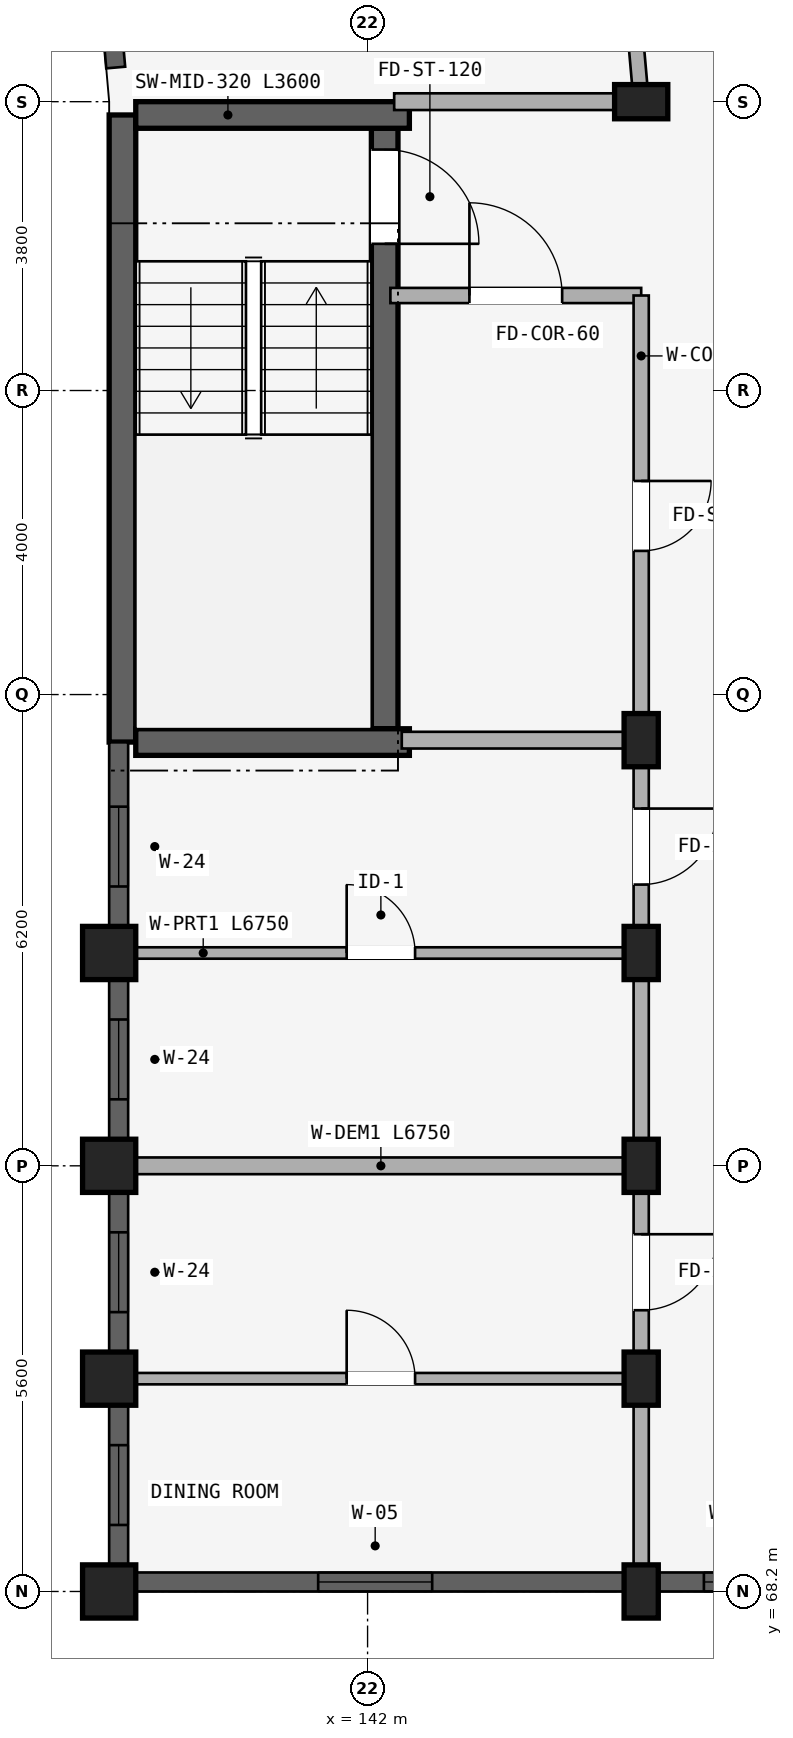
"""IFC4 building model, lengths in metres.
Left out: names, types, materials, properties, quantities, classifications, styles, units other than length and angle.
Written with IfcOpenShell. Run it as: python <this file> out.ifc"""

import sys

from ifc_helpers import new_model, si_unit, direction, frame, frame_2d, origin, origin_2d, place, context, subcontext, project, spatial, rectangle, extrude, element, fill, save


model = new_model("IFC4")
c1 = context("Model", 3, precision=1e-05, world=origin(), true_north=direction((0.0, 1.0)))
c2 = subcontext(c1, "Body", "Model", "MODEL_VIEW")
j1 = project(units=[si_unit("LENGTHUNIT", "METRE"), si_unit("PLANEANGLEUNIT", "RADIAN")], contexts=[c1])
p1 = place(None, origin())
s1 = spatial("IfcSite", under=j1, at=p1, CompositionType="ELEMENT")
p2 = place(p1, origin())
s2 = spatial("IfcBuilding", under=s1, at=p2, CompositionType="ELEMENT")
p3 = place(p2, frame((0.0, 0.0, 21.3)))
s3 = spatial("IfcBuildingStorey", under=s2, at=p3, CompositionType="ELEMENT", Elevation=21.3)
p4 = place(p3, frame((138.775, 87.625, 0.0), z_axis=(0.0, 0.0, 1.0), x_axis=(0.0, -1.0, 0.0)))
e1 = element("IfcWall", 1, at=p4, inside=s3, PredefinedType="SHEAR", context=c2, shape_type="SweptSolid", body=[
    extrude(rectangle(XDim=8.25, YDim=0.35, at=frame_2d((4.125, 0.0))), origin(), (0.0, 0.0, 1.0), 2.93),
])
p5 = place(p3, frame((142.225, 87.45, 0.0), z_axis=(0.0, 0.0, 1.0), x_axis=(0.0, -1.0, 0.0)))
e2 = element("IfcWall", 2, at=p5, inside=s3, PredefinedType="SHEAR", context=c2, shape_type="SweptSolid", body=[
    extrude(rectangle(XDim=7.9, YDim=0.35, at=frame_2d((3.95, 0.0))), origin(), (0.0, 0.0, 1.0), 2.93),
])
p6 = place(p5, frame((0.28, 0.0, 0.0)))
e3 = element("IfcOpeningElement", 3, at=p6, cuts=e2, PredefinedType="OPENING", context=c2, shape_type="SweptSolid", body=[
    extrude(rectangle(XDim=1.24, YDim=2.15, at=frame_2d((0.62, 1.075))), frame((0.0, 0.185, 0.0), z_axis=(0.0, -1.0, 0.0), x_axis=(1.0, 0.0, 0.0)), (0.0, 0.0, 1.0), 0.37),
])
for number, where, z_axis, x_axis in (
    (4, (138.95, 87.625, 0.0), (0.0, 0.0, 1.0), (1.0, 0.0, 0.0)),
    (5, (138.95, 79.375, 0.0), (0.0, 0.0, 1.0), (1.0, 0.0, 0.0)),
):
    element("IfcWall", number, at=place(p3, frame(where, z_axis=z_axis, x_axis=x_axis)), inside=s3, PredefinedType="SHEAR", context=c2, shape_type="SweptSolid", body=[
        extrude(rectangle(XDim=3.6, YDim=0.35, at=frame_2d((1.8, 0.0))), origin(), (0.0, 0.0, 1.0), 2.93),
    ])
for number, where, z_axis, x_axis in (
    (6, (145.6, 87.8, 0.0), (0.0, 0.0, 1.0), (0.0, 1.0, 0.0)),
    (7, (145.6, 79.4, 0.0), (0.0, 0.0, 1.0), (1.0, 0.0, 0.0)),
):
    element("IfcColumn", number, at=place(p3, frame(where, z_axis=z_axis, x_axis=x_axis)), inside=s3, PredefinedType="COLUMN", context=c2, shape_type="SweptSolid", body=[
        extrude(rectangle(XDim=0.45, YDim=0.7, at=origin_2d()), origin(), (0.0, 0.0, 1.0), 2.93),
    ])
p7 = place(p3, frame((138.6, 76.6, 0.0), z_axis=(0.0, 0.0, 1.0), x_axis=(1.0, 0.0, 0.0)))
e8 = element("IfcColumn", 8, at=p7, inside=s3, PredefinedType="COLUMN", context=c2, shape_type="SweptSolid", body=[
    extrude(rectangle(XDim=0.7, YDim=0.7, at=origin_2d()), origin(), (0.0, 0.0, 1.0), 2.93),
])
p8 = place(p3, frame((145.6, 76.6, 0.0), z_axis=(0.0, 0.0, 1.0), x_axis=(1.0, 0.0, 0.0)))
e9 = element("IfcColumn", 9, at=p8, inside=s3, PredefinedType="COLUMN", context=c2, shape_type="SweptSolid", body=[
    extrude(rectangle(XDim=0.45, YDim=0.7, at=origin_2d()), origin(), (0.0, 0.0, 1.0), 2.93),
])
p9 = place(p3, frame((138.6, 73.8, 0.0), z_axis=(0.0, 0.0, 1.0), x_axis=(1.0, 0.0, 0.0)))
e10 = element("IfcColumn", 10, at=p9, inside=s3, PredefinedType="COLUMN", context=c2, shape_type="SweptSolid", body=[
    extrude(rectangle(XDim=0.7, YDim=0.7, at=origin_2d()), origin(), (0.0, 0.0, 1.0), 2.93),
])
p10 = place(p3, frame((145.6, 73.8, 0.0), z_axis=(0.0, 0.0, 1.0), x_axis=(1.0, 0.0, 0.0)))
e11 = element("IfcColumn", 11, at=p10, inside=s3, PredefinedType="COLUMN", context=c2, shape_type="SweptSolid", body=[
    extrude(rectangle(XDim=0.45, YDim=0.7, at=origin_2d()), origin(), (0.0, 0.0, 1.0), 2.93),
])
p11 = place(p3, frame((138.6, 71.0, 0.0), z_axis=(0.0, 0.0, 1.0), x_axis=(1.0, 0.0, 0.0)))
e12 = element("IfcColumn", 12, at=p11, inside=s3, PredefinedType="COLUMN", context=c2, shape_type="SweptSolid", body=[
    extrude(rectangle(XDim=0.7, YDim=0.7, at=origin_2d()), origin(), (0.0, 0.0, 1.0), 2.93),
])
p12 = place(p3, frame((145.6, 71.0, 0.0), z_axis=(0.0, 0.0, 1.0), x_axis=(1.0, 0.0, 0.0)))
e13 = element("IfcColumn", 13, at=p12, inside=s3, PredefinedType="COLUMN", context=c2, shape_type="SweptSolid", body=[
    extrude(rectangle(XDim=0.45, YDim=0.7, at=origin_2d()), origin(), (0.0, 0.0, 1.0), 2.93),
])
p13 = place(p3, frame((138.6, 68.2, 0.0), z_axis=(0.0, 0.0, 1.0), x_axis=(1.0, 0.0, 0.0)))
e14 = element("IfcColumn", 14, at=p13, inside=s3, PredefinedType="COLUMN", context=c2, shape_type="SweptSolid", body=[
    extrude(rectangle(XDim=0.7, YDim=0.7, at=origin_2d()), origin(), (0.0, 0.0, 1.0), 2.93),
])
p14 = place(p3, frame((145.6, 68.2, 0.0), z_axis=(0.0, 0.0, 1.0), x_axis=(1.0, 0.0, 0.0)))
e15 = element("IfcColumn", 15, at=p14, inside=s3, PredefinedType="COLUMN", context=c2, shape_type="SweptSolid", body=[
    extrude(rectangle(XDim=0.45, YDim=0.7, at=origin_2d()), origin(), (0.0, 0.0, 1.0), 2.93),
])
p15 = place(p3, frame((142.3, 85.25, 0.0), z_axis=(0.0, 0.0, 1.0), x_axis=(1.0, 0.0, 0.0)))
e16 = element("IfcWall", 16, at=p15, inside=s3, PredefinedType="STANDARD", context=c2, shape_type="SweptSolid", body=[
    extrude(rectangle(XDim=3.3, YDim=0.2, at=frame_2d((1.65, 0.0))), origin(), (0.0, 0.0, 1.0), 2.372),
])
p16 = place(p15, frame((1.04, 0.0, 0.0)))
e17 = element("IfcOpeningElement", 17, at=p16, cuts=e16, PredefinedType="OPENING", context=c2, shape_type="SweptSolid", body=[
    extrude(rectangle(XDim=1.22, YDim=2.15, at=frame_2d((0.61, 1.075))), frame((0.0, 0.11, 0.0), z_axis=(0.0, -1.0, 0.0), x_axis=(1.0, 0.0, 0.0)), (0.0, 0.0, 1.0), 0.22),
])
p17 = place(p3, frame((145.6, 85.25, 0.0), z_axis=(0.0, 0.0, 1.0), x_axis=(0.0, -1.0, 0.0)))
e18 = element("IfcWall", 18, at=p17, inside=s3, PredefinedType="STANDARD", context=c2, shape_type="SweptSolid", body=[
    extrude(rectangle(XDim=5.8, YDim=0.2, at=frame_2d((2.9, 0.0))), origin(), (0.0, 0.0, 1.0), 2.372),
])
p18 = place(p17, frame((2.44, 0.0, 0.0)))
e19 = element("IfcOpeningElement", 19, at=p18, cuts=e18, PredefinedType="OPENING", context=c2, shape_type="SweptSolid", body=[
    extrude(rectangle(XDim=0.92, YDim=2.1, at=frame_2d((0.46, 1.05))), frame((0.0, 0.11, 0.0), z_axis=(0.0, -1.0, 0.0), x_axis=(1.0, 0.0, 0.0)), (0.0, 0.0, 1.0), 0.22),
])
p19 = place(p3, frame((145.208, 92.28, 0.0), z_axis=(0.0, 0.0, 1.0), x_axis=(0.087187153726, -0.996191949488, 0.0)))
e20 = element("IfcWall", 20, at=p19, inside=s3, PredefinedType="STANDARD", context=c2, shape_type="SweptSolid", body=[
    extrude(rectangle(XDim=4.497, YDim=0.2, at=frame_2d((2.249, 0.0))), origin(), (0.0, 0.0, 1.0), 2.372),
])
p20 = place(p3, frame((142.35, 87.8, 0.0), z_axis=(0.0, 0.0, 1.0), x_axis=(1.0, 0.0, 0.0)))
e21 = element("IfcWall", 21, at=p20, inside=s3, PredefinedType="STANDARD", context=c2, shape_type="SweptSolid", body=[
    extrude(rectangle(XDim=3.2, YDim=0.22, at=frame_2d((1.6, 0.0))), origin(), (0.0, 0.0, 1.0), 2.372),
])
p21 = place(p3, frame((145.6, 79.4, 0.0), z_axis=(0.0, 0.0, 1.0), x_axis=(0.0, -1.0, 0.0)))
e22 = element("IfcWall", 22, at=p21, inside=s3, PredefinedType="STANDARD", context=c2, shape_type="SweptSolid", body=[
    extrude(rectangle(XDim=2.8, YDim=0.2, at=frame_2d((1.4, 0.0))), origin(), (0.0, 0.0, 1.0), 2.372),
])
p22 = place(p21, frame((0.9, 0.0, 0.0)))
e23 = element("IfcOpeningElement", 23, at=p22, cuts=e22, PredefinedType="OPENING", context=c2, shape_type="SweptSolid", body=[
    extrude(rectangle(XDim=1.0, YDim=2.15, at=frame_2d((0.5, 1.075))), frame((0.0, 0.11, 0.0), z_axis=(0.0, -1.0, 0.0), x_axis=(1.0, 0.0, 0.0)), (0.0, 0.0, 1.0), 0.22),
])
p23 = place(p3, frame((142.45, 79.4, 0.0), z_axis=(0.0, 0.0, 1.0), x_axis=(1.0, 0.0, 0.0)))
e24 = element("IfcWall", 24, at=p23, inside=s3, PredefinedType="STANDARD", context=c2, shape_type="SweptSolid", body=[
    extrude(rectangle(XDim=3.1, YDim=0.22, at=frame_2d((1.55, 0.0))), origin(), (0.0, 0.0, 1.0), 2.372),
])
p24 = place(p3, frame((145.6, 76.6, 0.0), z_axis=(0.0, 0.0, 1.0), x_axis=(0.0, -1.0, 0.0)))
e25 = element("IfcWall", 25, at=p24, inside=s3, PredefinedType="STANDARD", context=c2, shape_type="SweptSolid", body=[
    extrude(rectangle(XDim=2.8, YDim=0.2, at=frame_2d((1.4, 0.0))), origin(), (0.0, 0.0, 1.0), 2.372),
])
p25 = place(p3, frame((138.8, 76.6, 0.0), z_axis=(0.0, 0.0, 1.0), x_axis=(1.0, 0.0, 0.0)))
e26 = element("IfcWall", 26, at=p25, inside=s3, PredefinedType="PARTITIONING", context=c2, shape_type="SweptSolid", body=[
    extrude(rectangle(XDim=6.75, YDim=0.15, at=frame_2d((3.375, 0.0))), origin(), (0.0, 0.0, 1.0), 2.372),
])
p26 = place(p25, frame((2.925, 0.0, 0.0)))
e27 = element("IfcOpeningElement", 27, at=p26, cuts=e26, PredefinedType="OPENING", context=c2, shape_type="SweptSolid", body=[
    extrude(rectangle(XDim=0.9, YDim=2.1, at=frame_2d((0.45, 1.05))), frame((0.0, 0.085, 0.0), z_axis=(0.0, -1.0, 0.0), x_axis=(1.0, 0.0, 0.0)), (0.0, 0.0, 1.0), 0.17),
])
p27 = place(p3, frame((145.6, 73.8, 0.0), z_axis=(0.0, 0.0, 1.0), x_axis=(0.0, -1.0, 0.0)))
e28 = element("IfcWall", 28, at=p27, inside=s3, PredefinedType="STANDARD", context=c2, shape_type="SweptSolid", body=[
    extrude(rectangle(XDim=2.8, YDim=0.2, at=frame_2d((1.4, 0.0))), origin(), (0.0, 0.0, 1.0), 2.372),
])
p28 = place(p27, frame((0.9, 0.0, 0.0)))
e29 = element("IfcOpeningElement", 29, at=p28, cuts=e28, PredefinedType="OPENING", context=c2, shape_type="SweptSolid", body=[
    extrude(rectangle(XDim=1.0, YDim=2.15, at=frame_2d((0.5, 1.075))), frame((0.0, 0.11, 0.0), z_axis=(0.0, -1.0, 0.0), x_axis=(1.0, 0.0, 0.0)), (0.0, 0.0, 1.0), 0.22),
])
p29 = place(p3, frame((138.8, 73.8, 0.0), z_axis=(0.0, 0.0, 1.0), x_axis=(1.0, 0.0, 0.0)))
e30 = element("IfcWall", 30, at=p29, inside=s3, PredefinedType="STANDARD", context=c2, shape_type="SweptSolid", body=[
    extrude(rectangle(XDim=6.75, YDim=0.22, at=frame_2d((3.375, 0.0))), origin(), (0.0, 0.0, 1.0), 2.372),
])
p30 = place(p3, frame((145.6, 71.0, 0.0), z_axis=(0.0, 0.0, 1.0), x_axis=(0.0, -1.0, 0.0)))
e31 = element("IfcWall", 31, at=p30, inside=s3, PredefinedType="STANDARD", context=c2, shape_type="SweptSolid", body=[
    extrude(rectangle(XDim=2.8, YDim=0.2, at=frame_2d((1.4, 0.0))), origin(), (0.0, 0.0, 1.0), 2.372),
])
p31 = place(p3, frame((138.8, 71.0, 0.0), z_axis=(0.0, 0.0, 1.0), x_axis=(1.0, 0.0, 0.0)))
e32 = element("IfcWall", 32, at=p31, inside=s3, PredefinedType="PARTITIONING", context=c2, shape_type="SweptSolid", body=[
    extrude(rectangle(XDim=6.75, YDim=0.15, at=frame_2d((3.375, 0.0))), origin(), (0.0, 0.0, 1.0), 2.372),
])
p32 = place(p31, frame((2.925, 0.0, 0.0)))
e33 = element("IfcOpeningElement", 33, at=p32, cuts=e32, PredefinedType="OPENING", context=c2, shape_type="SweptSolid", body=[
    extrude(rectangle(XDim=0.9, YDim=2.1, at=frame_2d((0.45, 1.05))), frame((0.0, 0.085, 0.0), z_axis=(0.0, -1.0, 0.0), x_axis=(1.0, 0.0, 0.0)), (0.0, 0.0, 1.0), 0.17),
])
p33 = place(p3, frame((138.461, 90.823, 0.0), z_axis=(0.0, 0.0, 1.0), x_axis=(0.087229084652, -0.996188278786, 0.0)))
e34 = element("IfcWall", 34, at=p33, inside=s3, PredefinedType="STANDARD", context=c2, shape_type="SweptSolid", body=[
    extrude(rectangle(XDim=2.583, YDim=0.25, at=frame_2d((1.292, 0.0))), origin(), (0.0, 0.0, 1.0), 2.472),
])
p34 = place(p33, frame((0.785, 0.0, 0.772)))
e35 = element("IfcOpeningElement", 35, at=p34, cuts=e34, PredefinedType="OPENING", context=c2, shape_type="SweptSolid", body=[
    extrude(rectangle(XDim=1.2, YDim=1.5, at=frame_2d((0.6, 0.75))), frame((0.0, 0.135, 0.0), z_axis=(0.0, -1.0, 0.0), x_axis=(1.0, 0.0, 0.0)), (0.0, 0.0, 1.0), 0.27),
])
p35 = place(p3, frame((138.725, 79.372, 0.0), z_axis=(0.0, 0.0, 1.0), x_axis=(0.0, -1.0, 0.0)))
e36 = element("IfcWall", 36, at=p35, inside=s3, PredefinedType="STANDARD", context=c2, shape_type="SweptSolid", body=[
    extrude(rectangle(XDim=2.418, YDim=0.25, at=frame_2d((1.209, 0.0))), origin(), (0.0, 0.0, 1.0), 2.472),
])
p36 = place(p35, frame((0.846, 0.0, 0.88)))
e37 = element("IfcOpeningElement", 37, at=p36, cuts=e36, PredefinedType="OPENING", context=c2, shape_type="SweptSolid", body=[
    extrude(rectangle(XDim=1.05, YDim=1.25, at=frame_2d((0.525, 0.625))), frame((0.0, 0.135, 0.0), z_axis=(0.0, -1.0, 0.0), x_axis=(1.0, 0.0, 0.0)), (0.0, 0.0, 1.0), 0.27),
])
p37 = place(p3, frame((138.725, 76.247, 0.0), z_axis=(0.0, 0.0, 1.0), x_axis=(0.0, -1.0, 0.0)))
e38 = element("IfcWall", 38, at=p37, inside=s3, PredefinedType="STANDARD", context=c2, shape_type="SweptSolid", body=[
    extrude(rectangle(XDim=2.093, YDim=0.25, at=frame_2d((1.046, 0.0))), origin(), (0.0, 0.0, 1.0), 2.472),
])
p38 = place(p37, frame((0.521, 0.0, 0.88)))
e39 = element("IfcOpeningElement", 39, at=p38, cuts=e38, PredefinedType="OPENING", context=c2, shape_type="SweptSolid", body=[
    extrude(rectangle(XDim=1.05, YDim=1.25, at=frame_2d((0.525, 0.625))), frame((0.0, 0.135, 0.0), z_axis=(0.0, -1.0, 0.0), x_axis=(1.0, 0.0, 0.0)), (0.0, 0.0, 1.0), 0.27),
])
p39 = place(p3, frame((138.725, 73.447, 0.0), z_axis=(0.0, 0.0, 1.0), x_axis=(0.0, -1.0, 0.0)))
e40 = element("IfcWall", 40, at=p39, inside=s3, PredefinedType="STANDARD", context=c2, shape_type="SweptSolid", body=[
    extrude(rectangle(XDim=2.093, YDim=0.25, at=frame_2d((1.046, 0.0))), origin(), (0.0, 0.0, 1.0), 2.472),
])
p40 = place(p39, frame((0.521, 0.0, 0.88)))
e41 = element("IfcOpeningElement", 41, at=p40, cuts=e40, PredefinedType="OPENING", context=c2, shape_type="SweptSolid", body=[
    extrude(rectangle(XDim=1.05, YDim=1.25, at=frame_2d((0.525, 0.625))), frame((0.0, 0.135, 0.0), z_axis=(0.0, -1.0, 0.0), x_axis=(1.0, 0.0, 0.0)), (0.0, 0.0, 1.0), 0.27),
])
p41 = place(p3, frame((138.725, 70.646, 0.0), z_axis=(0.0, 0.0, 1.0), x_axis=(0.0, -1.0, 0.0)))
e42 = element("IfcWall", 42, at=p41, inside=s3, PredefinedType="STANDARD", context=c2, shape_type="SweptSolid", body=[
    extrude(rectangle(XDim=2.093, YDim=0.25, at=frame_2d((1.046, 0.0))), origin(), (0.0, 0.0, 1.0), 2.472),
])
p42 = place(p41, frame((0.521, 0.0, 0.88)))
e43 = element("IfcOpeningElement", 43, at=p42, cuts=e42, PredefinedType="OPENING", context=c2, shape_type="SweptSolid", body=[
    extrude(rectangle(XDim=1.05, YDim=1.25, at=frame_2d((0.525, 0.625))), frame((0.0, 0.135, 0.0), z_axis=(0.0, -1.0, 0.0), x_axis=(1.0, 0.0, 0.0)), (0.0, 0.0, 1.0), 0.27),
])
p43 = place(p3, frame((138.954, 68.325, 0.0), z_axis=(0.0, 0.0, 1.0), x_axis=(1.0, 0.0, 0.0)))
e44 = element("IfcWall", 44, at=p43, inside=s3, PredefinedType="STANDARD", context=c2, shape_type="SweptSolid", body=[
    extrude(rectangle(XDim=6.418, YDim=0.25, at=frame_2d((3.209, 0.0))), origin(), (0.0, 0.0, 1.0), 2.372),
])
p44 = place(p43, frame((2.396, 0.0, 0.522)))
e45 = element("IfcOpeningElement", 45, at=p44, cuts=e44, PredefinedType="OPENING", context=c2, shape_type="SweptSolid", body=[
    extrude(rectangle(XDim=1.5, YDim=1.65, at=frame_2d((0.75, 0.825))), frame((0.0, 0.135, 0.0), z_axis=(0.0, -1.0, 0.0), x_axis=(1.0, 0.0, 0.0)), (0.0, 0.0, 1.0), 0.27),
])
p45 = place(p3, frame((145.829, 68.325, 0.0), z_axis=(0.0, 0.0, 1.0), x_axis=(1.0, 0.0, 0.0)))
e46 = element("IfcWall", 46, at=p45, inside=s3, PredefinedType="STANDARD", context=c2, shape_type="SweptSolid", body=[
    extrude(rectangle(XDim=1.943, YDim=0.25, at=frame_2d((0.971, 0.0))), origin(), (0.0, 0.0, 1.0), 2.372),
])
p46 = place(p45, frame((0.596, 0.0, 0.88)))
e47 = element("IfcOpeningElement", 47, at=p46, cuts=e46, PredefinedType="OPENING", context=c2, shape_type="SweptSolid", body=[
    extrude(rectangle(XDim=0.75, YDim=1.05, at=frame_2d((0.375, 0.525))), frame((0.0, 0.135, 0.0), z_axis=(0.0, -1.0, 0.0), x_axis=(1.0, 0.0, 0.0)), (0.0, 0.0, 1.0), 0.27),
])
p47 = place(p36, origin())
e48 = element("IfcWindow", 48, at=p47, inside=s3, PartitioningType="SINGLE_PANEL", PredefinedType="WINDOW", context=c2, shape_type="SweptSolid", body=[
    extrude(rectangle(XDim=1.05, YDim=1.25, at=frame_2d((0.525, 0.625))), frame((0.0, 0.03, 0.0), z_axis=(0.0, -1.0, 0.0), x_axis=(1.0, 0.0, 0.0)), (0.0, 0.0, 1.0), 0.06),
])
fill(e37, e48)
p48 = place(p38, origin())
e49 = element("IfcWindow", 49, at=p48, inside=s3, PartitioningType="SINGLE_PANEL", PredefinedType="WINDOW", context=c2, shape_type="SweptSolid", body=[
    extrude(rectangle(XDim=1.05, YDim=1.25, at=frame_2d((0.525, 0.625))), frame((0.0, 0.03, 0.0), z_axis=(0.0, -1.0, 0.0), x_axis=(1.0, 0.0, 0.0)), (0.0, 0.0, 1.0), 0.06),
])
fill(e39, e49)
p49 = place(p40, origin())
e50 = element("IfcWindow", 50, at=p49, inside=s3, PartitioningType="SINGLE_PANEL", PredefinedType="WINDOW", context=c2, shape_type="SweptSolid", body=[
    extrude(rectangle(XDim=1.05, YDim=1.25, at=frame_2d((0.525, 0.625))), frame((0.0, 0.03, 0.0), z_axis=(0.0, -1.0, 0.0), x_axis=(1.0, 0.0, 0.0)), (0.0, 0.0, 1.0), 0.06),
])
fill(e41, e50)
p50 = place(p42, origin())
e51 = element("IfcWindow", 51, at=p50, inside=s3, PartitioningType="SINGLE_PANEL", PredefinedType="WINDOW", context=c2, shape_type="SweptSolid", body=[
    extrude(rectangle(XDim=1.05, YDim=1.25, at=frame_2d((0.525, 0.625))), frame((0.0, 0.03, 0.0), z_axis=(0.0, -1.0, 0.0), x_axis=(1.0, 0.0, 0.0)), (0.0, 0.0, 1.0), 0.06),
])
fill(e43, e51)
p51 = place(p44, origin())
e52 = element("IfcWindow", 52, at=p51, inside=s3, PartitioningType="DOUBLE_PANEL_VERTICAL", PredefinedType="WINDOW", context=c2, shape_type="SweptSolid", body=[
    extrude(rectangle(XDim=1.5, YDim=1.65, at=frame_2d((0.75, 0.825))), frame((0.0, 0.03, 0.0), z_axis=(0.0, -1.0, 0.0), x_axis=(1.0, 0.0, 0.0)), (0.0, 0.0, 1.0), 0.06),
])
fill(e45, e52)
p52 = place(p46, origin())
e53 = element("IfcWindow", 53, at=p52, inside=s3, PartitioningType="SINGLE_PANEL", PredefinedType="WINDOW", context=c2, shape_type="SweptSolid", body=[
    extrude(rectangle(XDim=0.75, YDim=1.05, at=frame_2d((0.375, 0.525))), frame((0.0, 0.03, 0.0), z_axis=(0.0, -1.0, 0.0), x_axis=(1.0, 0.0, 0.0)), (0.0, 0.0, 1.0), 0.06),
])
fill(e47, e53)
p53 = place(p6, frame((1.24, 0.0, 0.0), z_axis=(0.0, 0.0, 1.0), x_axis=(-1.0, 0.0, 0.0)))
e54 = element("IfcDoor", 54, at=p53, inside=s3, OperationType="SINGLE_SWING_LEFT", PredefinedType="DOOR", context=c2, shape_type="SweptSolid", body=[
    extrude(rectangle(XDim=1.24, YDim=2.15, at=frame_2d((0.62, 1.075))), frame((0.0, 0.025, 0.0), z_axis=(0.0, -1.0, 0.0), x_axis=(1.0, 0.0, 0.0)), (0.0, 0.0, 1.0), 0.05),
])
fill(e3, e54)
p54 = place(p16, origin())
e55 = element("IfcDoor", 55, at=p54, inside=s3, OperationType="SINGLE_SWING_LEFT", PredefinedType="DOOR", context=c2, shape_type="SweptSolid", body=[
    extrude(rectangle(XDim=1.22, YDim=2.15, at=frame_2d((0.61, 1.075))), frame((0.0, 0.025, 0.0), z_axis=(0.0, -1.0, 0.0), x_axis=(1.0, 0.0, 0.0)), (0.0, 0.0, 1.0), 0.05),
])
fill(e17, e55)
p55 = place(p18, frame((0.92, 0.0, 0.0), z_axis=(0.0, 0.0, 1.0), x_axis=(-1.0, 0.0, 0.0)))
e56 = element("IfcDoor", 56, at=p55, inside=s3, OperationType="SINGLE_SWING_RIGHT", PredefinedType="DOOR", context=c2, shape_type="SweptSolid", body=[
    extrude(rectangle(XDim=0.92, YDim=2.1, at=frame_2d((0.46, 1.05))), frame((0.0, 0.025, 0.0), z_axis=(0.0, -1.0, 0.0), x_axis=(1.0, 0.0, 0.0)), (0.0, 0.0, 1.0), 0.05),
])
fill(e19, e56)
p56 = place(p22, frame((1.0, 0.0, 0.0), z_axis=(0.0, 0.0, 1.0), x_axis=(-1.0, 0.0, 0.0)))
e57 = element("IfcDoor", 57, at=p56, inside=s3, OperationType="SINGLE_SWING_RIGHT", PredefinedType="DOOR", context=c2, shape_type="SweptSolid", body=[
    extrude(rectangle(XDim=1.0, YDim=2.15, at=frame_2d((0.5, 1.075))), frame((0.0, 0.025, 0.0), z_axis=(0.0, -1.0, 0.0), x_axis=(1.0, 0.0, 0.0)), (0.0, 0.0, 1.0), 0.05),
])
fill(e23, e57)
p57 = place(p26, frame((0.9, 0.0, 0.0), z_axis=(0.0, 0.0, 1.0), x_axis=(-1.0, 0.0, 0.0)))
e58 = element("IfcDoor", 58, at=p57, inside=s3, OperationType="SINGLE_SWING_RIGHT", PredefinedType="DOOR", context=c2, shape_type="SweptSolid", body=[
    extrude(rectangle(XDim=0.9, YDim=2.1, at=frame_2d((0.45, 1.05))), frame((0.0, 0.025, 0.0), z_axis=(0.0, -1.0, 0.0), x_axis=(1.0, 0.0, 0.0)), (0.0, 0.0, 1.0), 0.05),
])
fill(e27, e58)
p58 = place(p28, frame((1.0, 0.0, 0.0), z_axis=(0.0, 0.0, 1.0), x_axis=(-1.0, 0.0, 0.0)))
e59 = element("IfcDoor", 59, at=p58, inside=s3, OperationType="SINGLE_SWING_RIGHT", PredefinedType="DOOR", context=c2, shape_type="SweptSolid", body=[
    extrude(rectangle(XDim=1.0, YDim=2.15, at=frame_2d((0.5, 1.075))), frame((0.0, 0.025, 0.0), z_axis=(0.0, -1.0, 0.0), x_axis=(1.0, 0.0, 0.0)), (0.0, 0.0, 1.0), 0.05),
])
fill(e29, e59)
p59 = place(p32, frame((0.9, 0.0, 0.0), z_axis=(0.0, 0.0, 1.0), x_axis=(-1.0, 0.0, 0.0)))
e60 = element("IfcDoor", 60, at=p59, inside=s3, OperationType="SINGLE_SWING_RIGHT", PredefinedType="DOOR", context=c2, shape_type="SweptSolid", body=[
    extrude(rectangle(XDim=0.9, YDim=2.1, at=frame_2d((0.45, 1.05))), frame((0.0, 0.025, 0.0), z_axis=(0.0, -1.0, 0.0), x_axis=(1.0, 0.0, 0.0)), (0.0, 0.0, 1.0), 0.05),
])
fill(e33, e60)
save(model, sys.argv[1])
